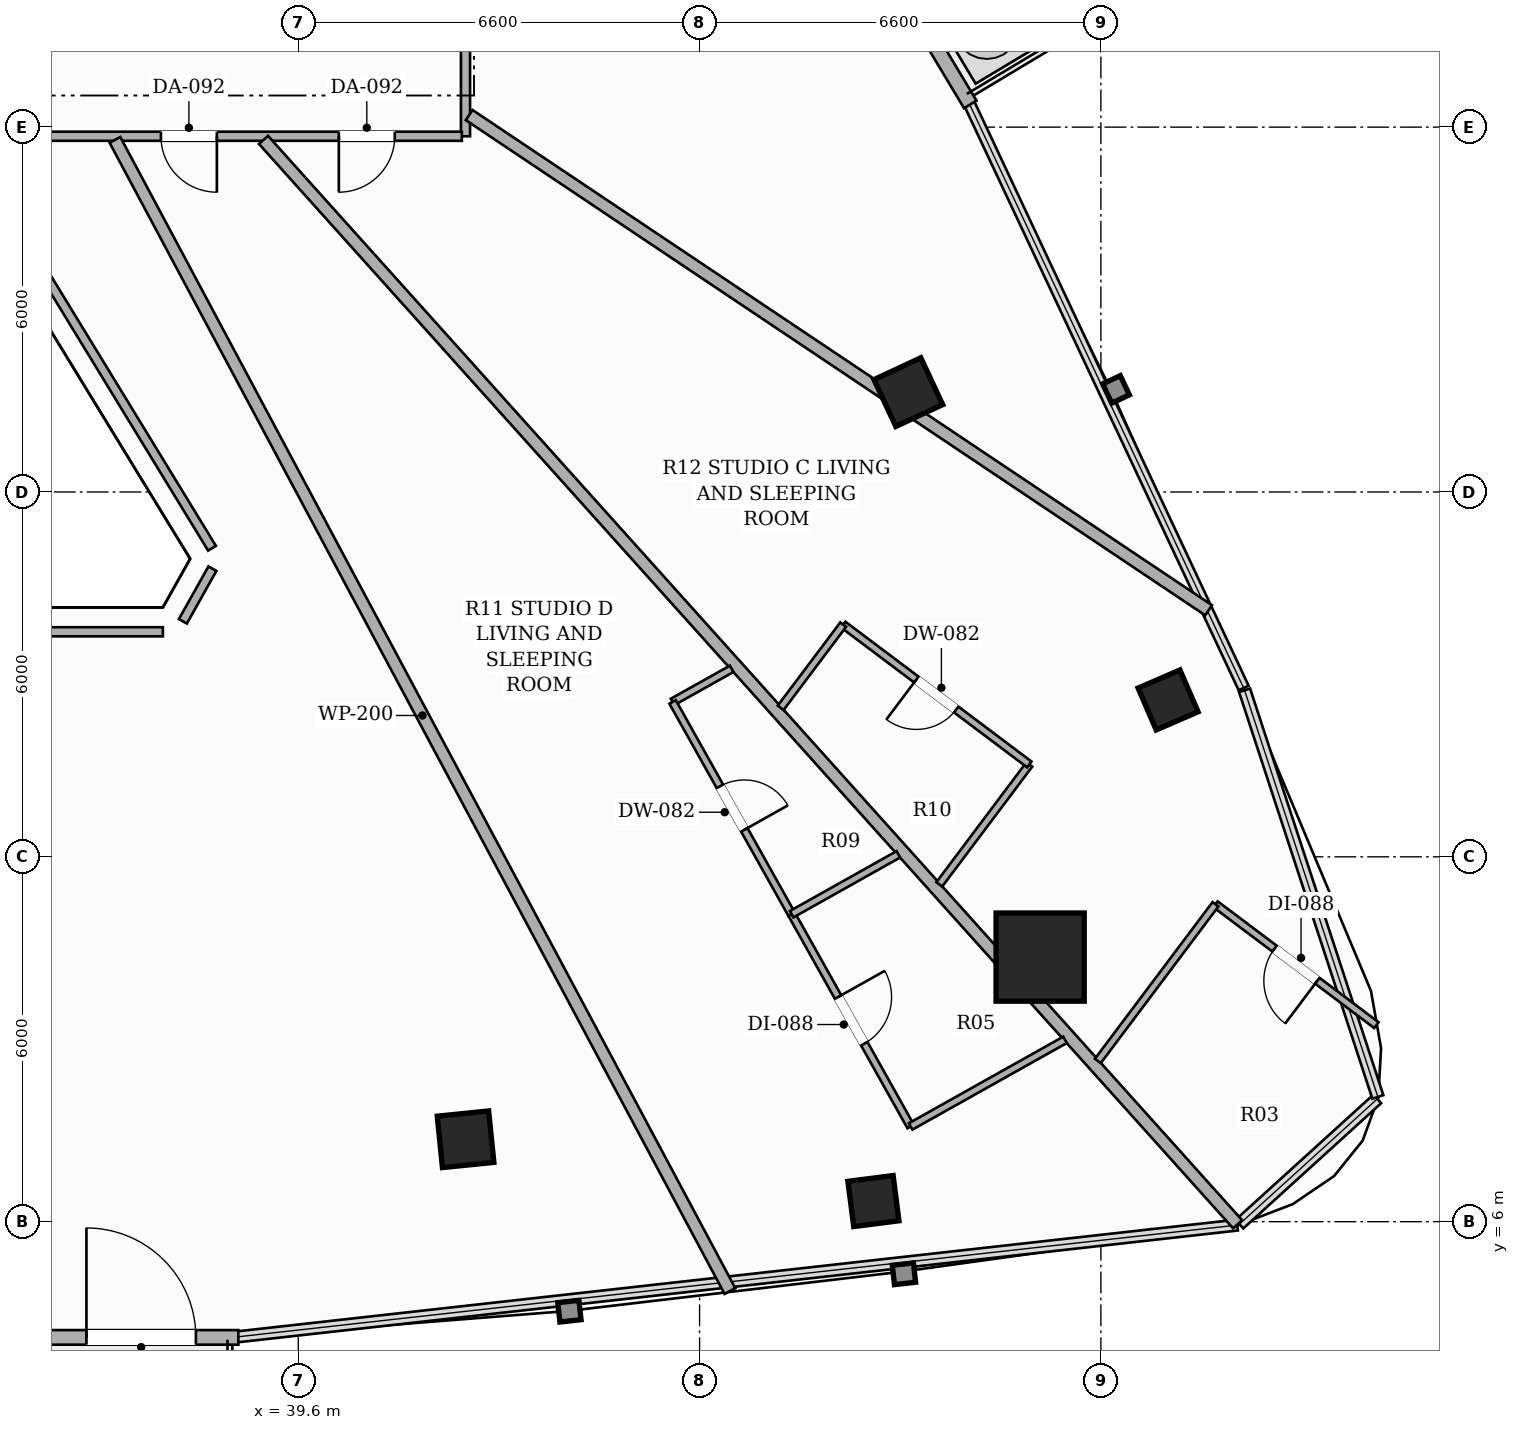
"""IFC4 building model, lengths in metres.
Left out: names, types, materials, properties, quantities, classifications, styles, units other than length and angle.
Written with IfcOpenShell. Run it as: python <this file> out.ifc"""

import sys

from ifc_helpers import new_model, si_unit, direction, frame, frame_2d, origin, origin_2d, place, context, subcontext, project, spatial, rectangle, hollow_rectangle, extrude, element, fill, save


model = new_model("IFC4")
c1 = context("Model", 3, precision=1e-05, world=origin(), true_north=direction((0.0, 1.0)))
c2 = subcontext(c1, "Body", "Model", "MODEL_VIEW")
j1 = project(units=[si_unit("LENGTHUNIT", "METRE"), si_unit("PLANEANGLEUNIT", "RADIAN")], contexts=[c1])
p1 = place(None, origin())
s1 = spatial("IfcSite", under=j1, at=p1, CompositionType="ELEMENT")
p2 = place(p1, origin())
s2 = spatial("IfcBuilding", under=s1, at=p2, CompositionType="ELEMENT")
p3 = place(p2, frame((0.0, 0.0, 183.65)))
s3 = spatial("IfcBuildingStorey", under=s2, at=p3, CompositionType="ELEMENT", Elevation=183.65)
p4 = place(p3, frame((51.801, 10.351, 0.0), z_axis=(0.0, 0.0, 1.0), x_axis=(1.0, 0.0, 0.0)))
e1 = element("IfcColumn", 1, at=p4, inside=s3, PredefinedType="COLUMN", context=c2, shape_type="SweptSolid", body=[
    extrude(hollow_rectangle(XDim=1.45, YDim=1.45, WallThickness=0.045, at=origin_2d()), origin(), (0.0, 0.0, 1.0), 3.3),
])
for number, where, z_axis, x_axis in (
    (2, (42.351, 7.355, 0.0), (0.0, 0.0, 1.0), (0.995, 0.101, 0.0)),
    (3, (49.633, 19.642, 0.0), (0.0, 0.0, 1.0), (-0.423, 0.906, 0.0)),
):
    element("IfcColumn", number, at=place(p3, frame(where, z_axis=z_axis, x_axis=x_axis)), inside=s3, PredefinedType="COLUMN", context=c2, shape_type="SweptSolid", body=[
        extrude(hollow_rectangle(XDim=0.85, YDim=0.85, WallThickness=0.028, at=origin_2d()), origin(), (0.0, 0.0, 1.0), 3.3),
    ])
for number, where, z_axis, x_axis in (
    (4, (49.059, 6.339, 0.0), (0.0, 0.0, 1.0), (0.992, 0.127, 0.0)),
    (5, (53.905, 14.58, 0.0), (0.0, 0.0, 1.0), (-0.397, 0.918, 0.0)),
):
    element("IfcColumn", number, at=place(p3, frame(where, z_axis=z_axis, x_axis=x_axis)), inside=s3, PredefinedType="COLUMN", context=c2, shape_type="SweptSolid", body=[
        extrude(hollow_rectangle(XDim=0.75, YDim=0.75, WallThickness=0.025, at=origin_2d()), origin(), (0.0, 0.0, 1.0), 3.3),
    ])
p5 = place(p3, frame((27.386, 4.097, 0.0), z_axis=(0.0, 0.0, 1.0), x_axis=(1.0, 0.0, 0.0)))
e6 = element("IfcWall", 6, at=p5, inside=s3, PredefinedType="SOLIDWALL", context=c2, shape_type="SweptSolid", body=[
    extrude(rectangle(XDim=11.228, YDim=0.24, at=frame_2d((5.614, 0.0))), origin(), (0.0, 0.0, 1.0), 2.584),
])
p6 = place(p5, frame((8.73, 0.0, 0.0)))
e7 = element("IfcOpeningElement", 7, at=p6, cuts=e6, PredefinedType="OPENING", context=c2, shape_type="SweptSolid", body=[
    extrude(rectangle(XDim=1.8, YDim=2.2, at=frame_2d((0.9, 1.1))), frame((0.0, 0.13, 0.0), z_axis=(0.0, -1.0, 0.0), x_axis=(1.0, 0.0, 0.0)), (0.0, 0.0, 1.0), 0.26),
])
p7 = place(p3, frame((50.652, 24.373, 0.0), z_axis=(0.0, 0.0, 1.0), x_axis=(-0.514290689074, 0.857615932182, 0.0)))
e8 = element("IfcWall", 8, at=p7, inside=s3, PredefinedType="SOLIDWALL", context=c2, shape_type="SweptSolid", body=[
    extrude(rectangle(XDim=10.856, YDim=0.24, at=frame_2d((5.428, 0.0))), origin(), (0.0, 0.0, 1.0), 2.584),
])
p8 = place(p7, frame((8.358, 0.0, 0.0)))
e9 = element("IfcOpeningElement", 9, at=p8, cuts=e8, PredefinedType="OPENING", context=c2, shape_type="SweptSolid", body=[
    extrude(rectangle(XDim=1.8, YDim=2.2, at=frame_2d((0.9, 1.1))), frame((0.0, 0.13, 0.0), z_axis=(0.0, -1.0, 0.0), x_axis=(1.0, 0.0, 0.0)), (0.0, 0.0, 1.0), 0.26),
])
p9 = place(p3, frame((42.35, 28.34, 0.0), z_axis=(0.0, 0.0, 1.0), x_axis=(0.0, -1.0, 0.0)))
e10 = element("IfcWall", 10, at=p9, inside=s3, PredefinedType="PARTITIONING", context=c2, shape_type="SweptSolid", body=[
    extrude(rectangle(XDim=4.49, YDim=0.15, at=frame_2d((2.245, 0.0))), origin(), (0.0, 0.0, 1.0), 2.681),
])
p10 = place(p9, frame((1.783, 0.0, 0.0)))
e11 = element("IfcOpeningElement", 11, at=p10, cuts=e10, PredefinedType="OPENING", context=c2, shape_type="SweptSolid", body=[
    extrude(rectangle(XDim=0.88, YDim=2.1, at=frame_2d((0.44, 1.05))), frame((0.0, 0.085, 0.0), z_axis=(0.0, -1.0, 0.0), x_axis=(1.0, 0.0, 0.0)), (0.0, 0.0, 1.0), 0.17),
])
p11 = place(p3, frame((42.29, 23.85, 0.0), z_axis=(0.0, 0.0, 1.0), x_axis=(-1.0, 0.0, 0.0)))
e12 = element("IfcWall", 12, at=p11, inside=s3, PredefinedType="PARTITIONING", context=c2, shape_type="SweptSolid", body=[
    extrude(rectangle(XDim=8.248, YDim=0.15, at=frame_2d((4.124, 0.0))), origin(), (0.0, 0.0, 1.0), 2.452),
])
p12 = place(p11, frame((1.103, 0.0, 0.0)))
e13 = element("IfcOpeningElement", 13, at=p12, cuts=e12, PredefinedType="OPENING", context=c2, shape_type="SweptSolid", body=[
    extrude(rectangle(XDim=0.92, YDim=2.15, at=frame_2d((0.46, 1.075))), frame((0.0, 0.085, 0.0), z_axis=(0.0, -1.0, 0.0), x_axis=(1.0, 0.0, 0.0)), (0.0, 0.0, 1.0), 0.17),
])
p13 = place(p11, frame((4.029, 0.0, 0.0)))
e14 = element("IfcOpeningElement", 14, at=p13, cuts=e12, PredefinedType="OPENING", context=c2, shape_type="SweptSolid", body=[
    extrude(rectangle(XDim=0.92, YDim=2.15, at=frame_2d((0.46, 1.075))), frame((0.0, 0.085, 0.0), z_axis=(0.0, -1.0, 0.0), x_axis=(1.0, 0.0, 0.0)), (0.0, 0.0, 1.0), 0.17),
])
p14 = place(p3, frame((34.079, 23.79, 0.0), z_axis=(0.0, 0.0, 1.0), x_axis=(0.521278062647, -0.853386888465, 0.0)))
e15 = element("IfcWall", 15, at=p14, inside=s3, PredefinedType="PARTITIONING", context=c2, shape_type="SweptSolid", body=[
    extrude(rectangle(XDim=7.869, YDim=0.15, at=frame_2d((3.934, 0.0))), origin(), (0.0, 0.0, 1.0), 2.681),
])
p15 = place(p3, frame((38.188, 16.739, 0.0), z_axis=(0.0, 0.0, 1.0), x_axis=(-0.489479004575, -0.872015082485, 0.0)))
e16 = element("IfcWall", 16, at=p15, inside=s3, PredefinedType="PARTITIONING", context=c2, shape_type="SweptSolid", body=[
    extrude(rectangle(XDim=0.993, YDim=0.15, at=frame_2d((0.497, 0.0))), origin(), (0.0, 0.0, 1.0), 3.02),
])
p16 = place(p3, frame((37.373, 15.701, 0.0), z_axis=(0.0, 0.0, 1.0), x_axis=(-1.0, 0.0, 0.0)))
e17 = element("IfcWall", 17, at=p16, inside=s3, PredefinedType="PARTITIONING", context=c2, shape_type="SweptSolid", body=[
    extrude(rectangle(XDim=8.746, YDim=0.15, at=frame_2d((4.373, 0.0))), origin(), (0.0, 0.0, 1.0), 2.681),
])
p17 = place(p3, frame((36.585, 23.79, 0.0), z_axis=(0.0, 0.0, 1.0), x_axis=(0.47121923303, -0.88201611914, 0.0)))
e18 = element("IfcWall", 18, at=p17, inside=s3, PredefinedType="PARTITIONING", context=c2, shape_type="SweptSolid", body=[
    extrude(rectangle(XDim=21.463, YDim=0.2, at=frame_2d((10.732, 0.0))), origin(), (0.0, 0.0, 1.0), 2.373),
])
p18 = place(p3, frame((54.571, 16.055, 0.0), z_axis=(0.0, 0.0, 1.0), x_axis=(-0.830893680957, 0.556431209535, 0.0)))
e19 = element("IfcWall", 19, at=p18, inside=s3, PredefinedType="PARTITIONING", context=c2, shape_type="SweptSolid", body=[
    extrude(rectangle(XDim=14.636, YDim=0.2, at=frame_2d((7.318, 0.0))), origin(), (0.0, 0.0, 1.0), 2.373),
])
p19 = place(p3, frame((55.049, 5.957, 0.0), z_axis=(0.0, 0.0, 1.0), x_axis=(-0.668302779631, 0.743889369958, 0.0)))
e20 = element("IfcWall", 20, at=p19, inside=s3, PredefinedType="PARTITIONING", context=c2, shape_type="SweptSolid", body=[
    extrude(rectangle(XDim=23.973, YDim=0.2, at=frame_2d((11.986, 0.0))), origin(), (0.0, 0.0, 1.0), 2.373),
])
p20 = place(p3, frame((50.142, 11.547, 0.0), z_axis=(0.0, 0.0, 1.0), x_axis=(0.600522581987, 0.799607796688, 0.0)))
e21 = element("IfcWall", 21, at=p20, inside=s3, PredefinedType="PARTITIONING", context=c2, shape_type="SweptSolid", body=[
    extrude(rectangle(XDim=2.466, YDim=0.12, at=frame_2d((1.233, 0.0))), origin(), (0.0, 0.0, 1.0), 2.452),
])
p21 = place(p3, frame((51.623, 13.519, 0.0), z_axis=(0.0, 0.0, 1.0), x_axis=(-0.799464069649, 0.600713909728, 0.0)))
e22 = element("IfcWall", 22, at=p21, inside=s3, PredefinedType="PARTITIONING", context=c2, shape_type="SweptSolid", body=[
    extrude(rectangle(XDim=3.829, YDim=0.12, at=frame_2d((1.915, 0.0))), origin(), (0.0, 0.0, 1.0), 3.02),
])
p22 = place(p21, frame((1.504, 0.0, 0.0)))
e23 = element("IfcOpeningElement", 23, at=p22, cuts=e22, PredefinedType="OPENING", context=c2, shape_type="SweptSolid", body=[
    extrude(rectangle(XDim=0.82, YDim=2.1, at=frame_2d((0.41, 1.05))), frame((0.0, 0.07, 0.0), z_axis=(0.0, -1.0, 0.0), x_axis=(1.0, 0.0, 0.0)), (0.0, 0.0, 1.0), 0.14),
])
p23 = place(p3, frame((48.562, 15.819, 0.0), z_axis=(0.0, 0.0, 1.0), x_axis=(-0.600820734403, -0.799383790874, 0.0)))
e24 = element("IfcWall", 24, at=p23, inside=s3, PredefinedType="PARTITIONING", context=c2, shape_type="SweptSolid", body=[
    extrude(rectangle(XDim=1.713, YDim=0.12, at=frame_2d((0.856, 0.0))), origin(), (0.0, 0.0, 1.0), 2.452),
])
p24 = place(p3, frame((57.331, 9.232, 0.0), z_axis=(0.0, 0.0, 1.0), x_axis=(-0.799486289087, 0.600684337704, 0.0)))
e25 = element("IfcWall", 25, at=p24, inside=s3, PredefinedType="PARTITIONING", context=c2, shape_type="SweptSolid", body=[
    extrude(rectangle(XDim=3.31, YDim=0.12, at=frame_2d((1.655, 0.0))), origin(), (0.0, 0.0, 1.0), 3.02),
])
p25 = place(p24, frame((1.215, 0.0, 0.0)))
e26 = element("IfcOpeningElement", 26, at=p25, cuts=e25, PredefinedType="OPENING", context=c2, shape_type="SweptSolid", body=[
    extrude(rectangle(XDim=0.88, YDim=2.1, at=frame_2d((0.44, 1.05))), frame((0.0, 0.07, 0.0), z_axis=(0.0, -1.0, 0.0), x_axis=(1.0, 0.0, 0.0)), (0.0, 0.0, 1.0), 0.14),
])
p26 = place(p3, frame((54.685, 11.22, 0.0), z_axis=(0.0, 0.0, 1.0), x_axis=(-0.600472636757, -0.799645304185, 0.0)))
e27 = element("IfcWall", 27, at=p26, inside=s3, PredefinedType="PARTITIONING", context=c2, shape_type="SweptSolid", body=[
    extrude(rectangle(XDim=3.223, YDim=0.12, at=frame_2d((1.611, 0.0))), origin(), (0.0, 0.0, 1.0), 3.02),
])
p27 = place(p3, frame((46.728, 15.092, 0.0), z_axis=(0.0, 0.0, 1.0), x_axis=(-0.872259310975, -0.489043652875, 0.0)))
e28 = element("IfcWall", 28, at=p27, inside=s3, PredefinedType="PARTITIONING", context=c2, shape_type="SweptSolid", body=[
    extrude(rectangle(XDim=1.114, YDim=0.12, at=frame_2d((0.557, 0.0))), origin(), (0.0, 0.0, 1.0), 3.02),
])
p28 = place(p3, frame((45.756, 14.547, 0.0), z_axis=(0.0, 0.0, 1.0), x_axis=(0.489160448732, -0.872193817564, 0.0)))
e29 = element("IfcWall", 29, at=p28, inside=s3, PredefinedType="PARTITIONING", context=c2, shape_type="SweptSolid", body=[
    extrude(rectangle(XDim=4.003, YDim=0.12, at=frame_2d((2.001, 0.0))), origin(), (0.0, 0.0, 1.0), 3.02),
])
p29 = place(p28, frame((1.591, 0.0, 0.0)))
e30 = element("IfcOpeningElement", 30, at=p29, cuts=e29, PredefinedType="OPENING", context=c2, shape_type="SweptSolid", body=[
    extrude(rectangle(XDim=0.82, YDim=2.1, at=frame_2d((0.41, 1.05))), frame((0.0, 0.07, 0.0), z_axis=(0.0, -1.0, 0.0), x_axis=(1.0, 0.0, 0.0)), (0.0, 0.0, 1.0), 0.14),
])
p30 = place(p3, frame((47.714, 11.056, 0.0), z_axis=(0.0, 0.0, 1.0), x_axis=(0.489058521283, -0.87225097464, 0.0)))
e31 = element("IfcWall", 31, at=p30, inside=s3, PredefinedType="PARTITIONING", context=c2, shape_type="SweptSolid", body=[
    extrude(rectangle(XDim=4.001, YDim=0.12, at=frame_2d((2.0, 0.0))), origin(), (0.0, 0.0, 1.0), 2.373),
])
p31 = place(p30, frame((1.561, 0.0, 0.0)))
e32 = element("IfcOpeningElement", 32, at=p31, cuts=e31, PredefinedType="OPENING", context=c2, shape_type="SweptSolid", body=[
    extrude(rectangle(XDim=0.88, YDim=2.1, at=frame_2d((0.44, 1.05))), frame((0.0, 0.07, 0.0), z_axis=(0.0, -1.0, 0.0), x_axis=(1.0, 0.0, 0.0)), (0.0, 0.0, 1.0), 0.14),
])
p32 = place(p3, frame((49.671, 7.566, 0.0), z_axis=(0.0, 0.0, 1.0), x_axis=(0.872184059235, 0.489177847838, 0.0)))
e33 = element("IfcWall", 33, at=p32, inside=s3, PredefinedType="PARTITIONING", context=c2, shape_type="SweptSolid", body=[
    extrude(rectangle(XDim=2.911, YDim=0.12, at=frame_2d((1.456, 0.0))), origin(), (0.0, 0.0, 1.0), 2.373),
])
p33 = place(p3, frame((49.469, 12.041, 0.0), z_axis=(0.0, 0.0, 1.0), x_axis=(-0.872002863311, -0.489500772602, 0.0)))
e34 = element("IfcWall", 34, at=p33, inside=s3, PredefinedType="PARTITIONING", context=c2, shape_type="SweptSolid", body=[
    extrude(rectangle(XDim=2.012, YDim=0.12, at=frame_2d((1.006, 0.0))), origin(), (0.0, 0.0, 1.0), 3.02),
])
p34 = place(p6, origin())
e35 = element("IfcDoor", 35, at=p34, inside=s3, OperationType="SINGLE_SWING_LEFT", PredefinedType="DOOR", context=c2, shape_type="SweptSolid", body=[
    extrude(rectangle(XDim=1.8, YDim=2.2, at=frame_2d((0.9, 1.1))), frame((0.0, 0.025, 0.0), z_axis=(0.0, -1.0, 0.0), x_axis=(1.0, 0.0, 0.0)), (0.0, 0.0, 1.0), 0.05),
])
fill(e7, e35)
p35 = place(p12, origin())
e36 = element("IfcDoor", 36, at=p35, inside=s3, OperationType="SINGLE_SWING_RIGHT", PredefinedType="DOOR", context=c2, shape_type="SweptSolid", body=[
    extrude(rectangle(XDim=0.92, YDim=2.15, at=frame_2d((0.46, 1.075))), frame((0.0, 0.025, 0.0), z_axis=(0.0, -1.0, 0.0), x_axis=(1.0, 0.0, 0.0)), (0.0, 0.0, 1.0), 0.05),
])
fill(e13, e36)
p36 = place(p22, origin())
e37 = element("IfcDoor", 37, at=p36, inside=s3, OperationType="SINGLE_SWING_RIGHT", PredefinedType="DOOR", context=c2, shape_type="SweptSolid", body=[
    extrude(rectangle(XDim=0.82, YDim=2.1, at=frame_2d((0.41, 1.05))), frame((0.0, 0.025, 0.0), z_axis=(0.0, -1.0, 0.0), x_axis=(1.0, 0.0, 0.0)), (0.0, 0.0, 1.0), 0.05),
])
fill(e23, e37)
p37 = place(p25, origin())
e38 = element("IfcDoor", 38, at=p37, inside=s3, OperationType="SINGLE_SWING_LEFT", PredefinedType="DOOR", context=c2, shape_type="SweptSolid", body=[
    extrude(rectangle(XDim=0.88, YDim=2.1, at=frame_2d((0.44, 1.05))), frame((0.0, 0.025, 0.0), z_axis=(0.0, -1.0, 0.0), x_axis=(1.0, 0.0, 0.0)), (0.0, 0.0, 1.0), 0.05),
])
fill(e26, e38)
p38 = place(p13, origin())
e39 = element("IfcDoor", 39, at=p38, inside=s3, OperationType="SINGLE_SWING_LEFT", PredefinedType="DOOR", context=c2, shape_type="SweptSolid", body=[
    extrude(rectangle(XDim=0.92, YDim=2.15, at=frame_2d((0.46, 1.075))), frame((0.0, 0.025, 0.0), z_axis=(0.0, -1.0, 0.0), x_axis=(1.0, 0.0, 0.0)), (0.0, 0.0, 1.0), 0.05),
])
fill(e14, e39)
p39 = place(p29, origin())
e40 = element("IfcDoor", 40, at=p39, inside=s3, OperationType="SINGLE_SWING_RIGHT", PredefinedType="DOOR", context=c2, shape_type="SweptSolid", body=[
    extrude(rectangle(XDim=0.82, YDim=2.1, at=frame_2d((0.41, 1.05))), frame((0.0, 0.025, 0.0), z_axis=(0.0, -1.0, 0.0), x_axis=(1.0, 0.0, 0.0)), (0.0, 0.0, 1.0), 0.05),
])
fill(e30, e40)
p40 = place(p31, origin())
e41 = element("IfcDoor", 41, at=p40, inside=s3, OperationType="SINGLE_SWING_LEFT", PredefinedType="DOOR", context=c2, shape_type="SweptSolid", body=[
    extrude(rectangle(XDim=0.88, YDim=2.1, at=frame_2d((0.44, 1.05))), frame((0.0, 0.025, 0.0), z_axis=(0.0, -1.0, 0.0), x_axis=(1.0, 0.0, 0.0)), (0.0, 0.0, 1.0), 0.05),
])
fill(e32, e41)
save(model, sys.argv[1])
